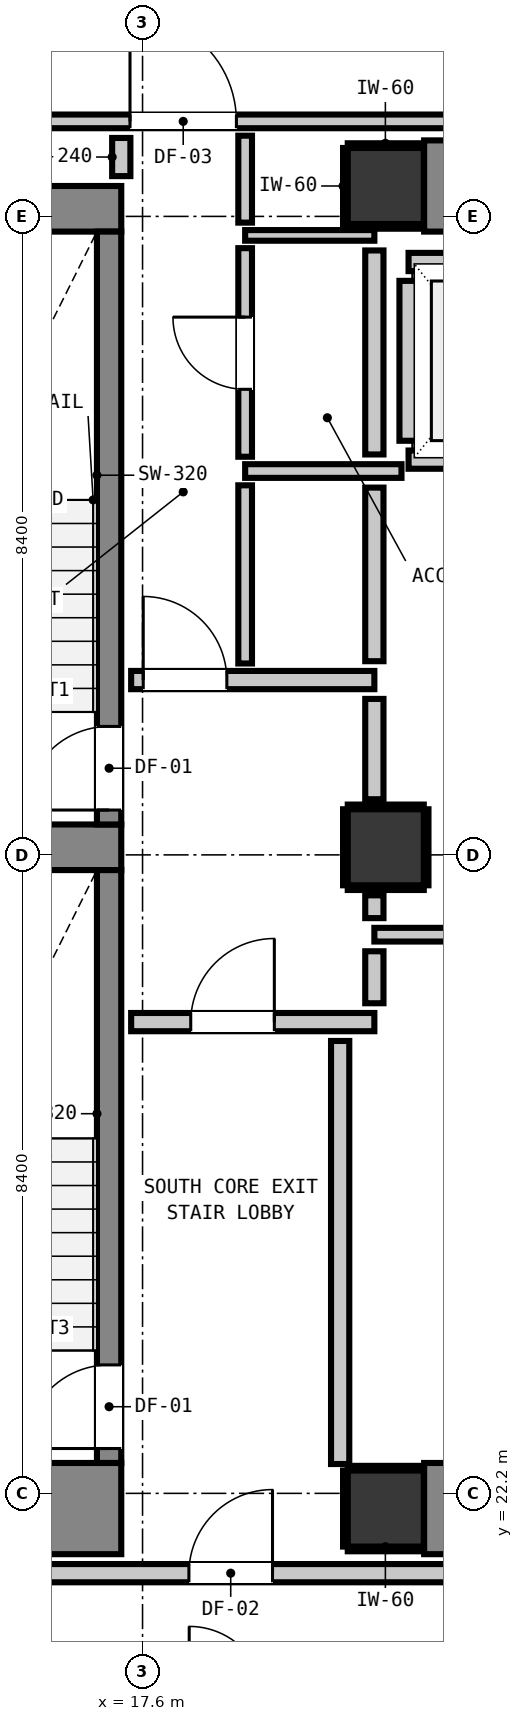
"""IFC4 building model, lengths in metres.
Left out: names, types, materials, properties, quantities, classifications, styles, units other than length and angle.
Written with IfcOpenShell. Run it as: python <this file> out.ifc"""

import sys

from ifc_helpers import new_model, si_unit, direction, frame, frame_2d, origin, origin_2d, place, context, subcontext, project, spatial, rectangle, extrude, element, fill, save


model = new_model("IFC4")
c1 = context("Model", 3, precision=1e-05, world=origin(), true_north=direction((0.0, 1.0)))
c2 = subcontext(c1, "Body", "Model", "MODEL_VIEW")
j1 = project(units=[si_unit("LENGTHUNIT", "METRE"), si_unit("PLANEANGLEUNIT", "RADIAN")], contexts=[c1])
p1 = place(None, origin())
s1 = spatial("IfcSite", under=j1, at=p1, CompositionType="ELEMENT")
p2 = place(p1, origin())
s2 = spatial("IfcBuilding", under=s1, at=p2, CompositionType="ELEMENT")
p3 = place(p2, frame((0.0, 0.0, 71.8)))
s3 = spatial("IfcBuildingStorey", under=s2, at=p3, CompositionType="ELEMENT", Elevation=71.8)
for number, where, z_axis, x_axis in (
    (1, (20.8, 22.0, 0.0), (0.0, 0.0, 1.0), (1.0, 0.0, 0.0)),
    (2, (20.8, 39.4, 0.0), (0.0, 0.0, 1.0), (1.0, 0.0, 0.0)),
):
    element("IfcColumn", number, at=place(p3, frame(where, z_axis=z_axis, x_axis=x_axis)), inside=s3, PredefinedType="COLUMN", context=c2, shape_type="SweptSolid", body=[
        extrude(rectangle(XDim=1.0, YDim=1.0, at=origin_2d()), origin(), (0.0, 0.0, 1.0), 3.32),
    ])
p4 = place(p3, frame((13.24, 22.0, 0.0), z_axis=(0.0, 0.0, 1.0), x_axis=(1.0, 0.0, 0.0)))
e3 = element("IfcWall", 3, at=p4, inside=s3, PredefinedType="SHEAR", context=c2, shape_type="SweptSolid", body=[
    extrude(rectangle(XDim=4.08, YDim=1.2, at=frame_2d((2.04, 0.0))), origin(), (0.0, 0.0, 1.0), 3.32),
])
p5 = place(p3, frame((13.24, 39.1, 0.0), z_axis=(0.0, 0.0, 1.0), x_axis=(1.0, 0.0, 0.0)))
e4 = element("IfcWall", 4, at=p5, inside=s3, PredefinedType="SHEAR", context=c2, shape_type="SweptSolid", body=[
    extrude(rectangle(XDim=4.08, YDim=0.6, at=frame_2d((2.04, 0.0))), origin(), (0.0, 0.0, 1.0), 3.32),
])
p6 = place(p3, frame((13.905, 30.7, 0.0), z_axis=(0.0, 0.0, 1.0), x_axis=(1.0, 0.0, 0.0)))
e5 = element("IfcWall", 5, at=p6, inside=s3, PredefinedType="SHEAR", context=c2, shape_type="SweptSolid", body=[
    extrude(rectangle(XDim=3.415, YDim=0.6, at=frame_2d((1.708, 0.0))), origin(), (0.0, 0.0, 1.0), 3.32),
])
for number, where, z_axis, x_axis in (
    (6, (21.305, 22.0, 0.0), (0.0, 0.0, 1.0), (1.0, 0.0, 0.0)),
    (7, (21.305, 39.4, 0.0), (0.0, 0.0, 1.0), (1.0, 0.0, 0.0)),
):
    element("IfcWall", number, at=place(p3, frame(where, z_axis=z_axis, x_axis=x_axis)), inside=s3, PredefinedType="SHEAR", context=c2, shape_type="SweptSolid", body=[
        extrude(rectangle(XDim=7.39, YDim=1.2, at=frame_2d((3.695, 0.0))), origin(), (0.0, 0.0, 1.0), 3.32),
    ])
p7 = place(p3, frame((17.16, 31.0, 0.0), z_axis=(0.0, 0.0, 1.0), x_axis=(0.0, 1.0, 0.0)))
e8 = element("IfcWall", 8, at=p7, inside=s3, PredefinedType="SHEAR", context=c2, shape_type="SweptSolid", body=[
    extrude(rectangle(XDim=7.8, YDim=0.32, at=frame_2d((3.9, 0.0))), origin(), (0.0, 0.0, 1.0), 3.32),
])
p8 = place(p7, frame((0.19, 0.0, 0.0)))
e9 = element("IfcOpeningElement", 9, at=p8, cuts=e8, PredefinedType="OPENING", context=c2, shape_type="SweptSolid", body=[
    extrude(rectangle(XDim=1.1, YDim=2.15, at=frame_2d((0.55, 1.075))), frame((0.0, 0.17, 0.0), z_axis=(0.0, -1.0, 0.0), x_axis=(1.0, 0.0, 0.0)), (0.0, 0.0, 1.0), 0.34),
])
p9 = place(p3, frame((17.16, 22.6, 0.0), z_axis=(0.0, 0.0, 1.0), x_axis=(0.0, 1.0, 0.0)))
e10 = element("IfcWall", 10, at=p9, inside=s3, PredefinedType="SHEAR", context=c2, shape_type="SweptSolid", body=[
    extrude(rectangle(XDim=7.8, YDim=0.32, at=frame_2d((3.9, 0.0))), origin(), (0.0, 0.0, 1.0), 3.32),
])
p10 = place(p9, frame((0.19, 0.0, 0.0)))
e11 = element("IfcOpeningElement", 11, at=p10, cuts=e10, PredefinedType="OPENING", context=c2, shape_type="SweptSolid", body=[
    extrude(rectangle(XDim=1.1, YDim=2.15, at=frame_2d((0.55, 1.075))), frame((0.0, 0.17, 0.0), z_axis=(0.0, -1.0, 0.0), x_axis=(1.0, 0.0, 0.0)), (0.0, 0.0, 1.0), 0.34),
])
p11 = place(p3, frame((20.8, 30.7, 0.0), z_axis=(0.0, 0.0, 1.0), x_axis=(1.0, 0.0, 0.0)))
e12 = element("IfcColumn", 12, at=p11, inside=s3, PredefinedType="COLUMN", context=c2, shape_type="SweptSolid", body=[
    extrude(rectangle(XDim=1.0, YDim=1.0, at=origin_2d()), origin(), (0.0, 0.0, 1.0), 3.32),
])
for number, where, z_axis, x_axis in (
    (13, (21.1, 35.8, 0.0), (0.0, 0.0, 1.0), (1.0, 0.0, 0.0)),
    (14, (21.1, 38.4, 0.0), (0.0, 0.0, 1.0), (1.0, 0.0, 0.0)),
):
    element("IfcWall", number, at=place(p3, frame(where, z_axis=z_axis, x_axis=x_axis)), inside=s3, PredefinedType="PARTITIONING", context=c2, shape_type="SweptSolid", body=[
        extrude(rectangle(XDim=2.2, YDim=0.24, at=frame_2d((1.1, 0.0))), origin(), (0.0, 0.0, 1.0), 3.06),
    ])
p12 = place(p3, frame((21.1, 36.048, 0.0), z_axis=(0.0, 0.0, 1.0), x_axis=(0.0, 1.0, 0.0)))
e15 = element("IfcWall", 15, at=p12, inside=s3, PredefinedType="PARTITIONING", context=c2, shape_type="SweptSolid", body=[
    extrude(rectangle(XDim=2.104, YDim=0.24, at=frame_2d((1.052, 0.0))), origin(), (0.0, 0.0, 1.0), 2.295),
])
p13 = place(p3, frame((10.15, 21.15, 0.0), z_axis=(0.0, 0.0, 1.0), x_axis=(1.0, 0.0, 0.0)))
e16 = element("IfcWall", 16, at=p13, inside=s3, PredefinedType="PARTITIONING", context=c2, shape_type="SweptSolid", body=[
    extrude(rectangle(XDim=26.779, YDim=0.24, at=frame_2d((13.39, 0.0))), origin(), (0.0, 0.0, 1.0), 3.06),
])
p14 = place(p13, frame((8.06, 0.0, 0.0)))
e17 = element("IfcOpeningElement", 17, at=p14, cuts=e16, PredefinedType="OPENING", context=c2, shape_type="SweptSolid", body=[
    extrude(rectangle(XDim=1.1, YDim=2.15, at=frame_2d((0.55, 1.075))), frame((0.0, 0.13, 0.0), z_axis=(0.0, -1.0, 0.0), x_axis=(1.0, 0.0, 0.0)), (0.0, 0.0, 1.0), 0.26),
])
p15 = place(p13, frame((0.324, 0.0, 0.0)))
e18 = element("IfcOpeningElement", 18, at=p15, cuts=e16, PredefinedType="OPENING", context=c2, shape_type="SweptSolid", body=[
    extrude(rectangle(XDim=1.4, YDim=2.15, at=frame_2d((0.7, 1.075))), frame((0.0, 0.13, 0.0), z_axis=(0.0, -1.0, 0.0), x_axis=(1.0, 0.0, 0.0)), (0.0, 0.0, 1.0), 0.26),
])
p16 = place(p3, frame((17.45, 28.4, 0.0), z_axis=(0.0, 0.0, 1.0), x_axis=(1.0, 0.0, 0.0)))
e19 = element("IfcWall", 19, at=p16, inside=s3, PredefinedType="PARTITIONING", context=c2, shape_type="SweptSolid", body=[
    extrude(rectangle(XDim=3.2, YDim=0.24, at=frame_2d((1.6, 0.0))), origin(), (0.0, 0.0, 1.0), 3.06),
])
p17 = place(p16, frame((0.784, 0.0, 0.0)))
e20 = element("IfcOpeningElement", 20, at=p17, cuts=e19, PredefinedType="OPENING", context=c2, shape_type="SweptSolid", body=[
    extrude(rectangle(XDim=1.1, YDim=2.15, at=frame_2d((0.55, 1.075))), frame((0.0, 0.13, 0.0), z_axis=(0.0, -1.0, 0.0), x_axis=(1.0, 0.0, 0.0)), (0.0, 0.0, 1.0), 0.26),
])
p18 = place(p3, frame((17.45, 32.9, 0.0), z_axis=(0.0, 0.0, 1.0), x_axis=(1.0, 0.0, 0.0)))
e21 = element("IfcWall", 21, at=p18, inside=s3, PredefinedType="PARTITIONING", context=c2, shape_type="SweptSolid", body=[
    extrude(rectangle(XDim=3.2, YDim=0.24, at=frame_2d((1.6, 0.0))), origin(), (0.0, 0.0, 1.0), 3.06),
])
p19 = place(p18, frame((0.159, 0.0, 0.0)))
e22 = element("IfcOpeningElement", 22, at=p19, cuts=e21, PredefinedType="OPENING", context=c2, shape_type="SweptSolid", body=[
    extrude(rectangle(XDim=1.1, YDim=2.15, at=frame_2d((0.55, 1.075))), frame((0.0, 0.13, 0.0), z_axis=(0.0, -1.0, 0.0), x_axis=(1.0, 0.0, 0.0)), (0.0, 0.0, 1.0), 0.26),
])
p20 = place(p3, frame((20.65, 29.55, 0.0), z_axis=(0.0, 0.0, 1.0), x_axis=(1.0, 0.0, 0.0)))
e23 = element("IfcWall", 23, at=p20, inside=s3, PredefinedType="PARTITIONING", context=c2, shape_type="SweptSolid", body=[
    extrude(rectangle(XDim=9.325, YDim=0.18, at=frame_2d((4.663, 0.0))), origin(), (0.0, 0.0, 1.0), 3.06),
])
p21 = place(p3, frame((18.95, 35.65, 0.0), z_axis=(0.0, 0.0, 1.0), x_axis=(1.0, 0.0, 0.0)))
e24 = element("IfcWall", 24, at=p21, inside=s3, PredefinedType="PARTITIONING", context=c2, shape_type="SweptSolid", body=[
    extrude(rectangle(XDim=2.057, YDim=0.18, at=frame_2d((1.029, 0.0))), origin(), (0.0, 0.0, 1.0), 3.06),
])
p22 = place(p3, frame((10.15, 40.25, 0.0), z_axis=(0.0, 0.0, 1.0), x_axis=(1.0, 0.0, 0.0)))
e25 = element("IfcWall", 25, at=p22, inside=s3, PredefinedType="PARTITIONING", context=c2, shape_type="SweptSolid", body=[
    extrude(rectangle(XDim=40.023, YDim=0.18, at=frame_2d((20.012, 0.0))), origin(), (0.0, 0.0, 1.0), 3.06),
])
p23 = place(p22, frame((7.285, 0.0, 0.0)))
e26 = element("IfcOpeningElement", 26, at=p23, cuts=e25, PredefinedType="OPENING", context=c2, shape_type="SweptSolid", body=[
    extrude(rectangle(XDim=1.4, YDim=2.15, at=frame_2d((0.7, 1.075))), frame((0.0, 0.1, 0.0), z_axis=(0.0, -1.0, 0.0), x_axis=(1.0, 0.0, 0.0)), (0.0, 0.0, 1.0), 0.2),
])
p24 = place(p22, frame((0.324, 0.0, 0.0)))
e27 = element("IfcOpeningElement", 27, at=p24, cuts=e25, PredefinedType="OPENING", context=c2, shape_type="SweptSolid", body=[
    extrude(rectangle(XDim=1.4, YDim=2.15, at=frame_2d((0.7, 1.075))), frame((0.0, 0.1, 0.0), z_axis=(0.0, -1.0, 0.0), x_axis=(1.0, 0.0, 0.0)), (0.0, 0.0, 1.0), 0.2),
])
p25 = place(p22, frame((33.574, 0.0, 0.0)))
e28 = element("IfcOpeningElement", 28, at=p25, cuts=e25, PredefinedType="OPENING", context=c2, shape_type="SweptSolid", body=[
    extrude(rectangle(XDim=1.0, YDim=2.15, at=frame_2d((0.5, 1.075))), frame((0.0, 0.1, 0.0), z_axis=(0.0, -1.0, 0.0), x_axis=(1.0, 0.0, 0.0)), (0.0, 0.0, 1.0), 0.2),
])
p26 = place(p3, frame((18.95, 38.75, 0.0), z_axis=(0.0, 0.0, 1.0), x_axis=(1.0, 0.0, 0.0)))
e29 = element("IfcWall", 29, at=p26, inside=s3, PredefinedType="PARTITIONING", context=c2, shape_type="SweptSolid", body=[
    extrude(rectangle(XDim=1.7, YDim=0.14, at=frame_2d((0.85, 0.0))), origin(), (0.0, 0.0, 1.0), 3.06),
])
p27 = place(p3, frame((17.32, 39.53, 0.0), z_axis=(0.0, 0.0, 1.0), x_axis=(0.0, 1.0, 0.0)))
e30 = element("IfcWall", 30, at=p27, inside=s3, PredefinedType="PARTITIONING", context=c2, shape_type="SweptSolid", body=[
    extrude(rectangle(XDim=0.502, YDim=0.24, at=frame_2d((0.251, 0.0))), origin(), (0.0, 0.0, 1.0), 3.06),
])
p28 = place(p3, frame((20.2, 22.586, 0.0), z_axis=(0.0, 0.0, 1.0), x_axis=(0.0, 1.0, 0.0)))
e31 = element("IfcWall", 31, at=p28, inside=s3, PredefinedType="PARTITIONING", context=c2, shape_type="SweptSolid", body=[
    extrude(rectangle(XDim=5.566, YDim=0.24, at=frame_2d((2.783, 0.0))), origin(), (0.0, 0.0, 1.0), 3.06),
])
p29 = place(p3, frame((20.65, 28.648, 0.0), z_axis=(0.0, 0.0, 1.0), x_axis=(0.0, 1.0, 0.0)))
e32 = element("IfcWall", 32, at=p29, inside=s3, PredefinedType="PARTITIONING", context=c2, shape_type="SweptSolid", body=[
    extrude(rectangle(XDim=0.684, YDim=0.24, at=frame_2d((0.342, 0.0))), origin(), (0.0, 0.0, 1.0), 2.295),
])
p30 = place(p3, frame((20.65, 29.768, 0.0), z_axis=(0.0, 0.0, 1.0), x_axis=(0.0, 1.0, 0.0)))
e33 = element("IfcWall", 33, at=p30, inside=s3, PredefinedType="PARTITIONING", context=c2, shape_type="SweptSolid", body=[
    extrude(rectangle(XDim=0.3, YDim=0.24, at=frame_2d((0.15, 0.0))), origin(), (0.0, 0.0, 1.0), 2.295),
])
p31 = place(p3, frame((20.65, 31.332, 0.0), z_axis=(0.0, 0.0, 1.0), x_axis=(0.0, 1.0, 0.0)))
e34 = element("IfcWall", 34, at=p31, inside=s3, PredefinedType="PARTITIONING", context=c2, shape_type="SweptSolid", body=[
    extrude(rectangle(XDim=1.32, YDim=0.24, at=frame_2d((0.66, 0.0))), origin(), (0.0, 0.0, 1.0), 2.295),
])
p32 = place(p3, frame((20.65, 33.148, 0.0), z_axis=(0.0, 0.0, 1.0), x_axis=(0.0, 1.0, 0.0)))
e35 = element("IfcWall", 35, at=p32, inside=s3, PredefinedType="PARTITIONING", context=c2, shape_type="SweptSolid", body=[
    extrude(rectangle(XDim=2.284, YDim=0.24, at=frame_2d((1.142, 0.0))), origin(), (0.0, 0.0, 1.0), 2.295),
])
p33 = place(p3, frame((20.65, 35.868, 0.0), z_axis=(0.0, 0.0, 1.0), x_axis=(0.0, 1.0, 0.0)))
e36 = element("IfcWall", 36, at=p33, inside=s3, PredefinedType="PARTITIONING", context=c2, shape_type="SweptSolid", body=[
    extrude(rectangle(XDim=2.684, YDim=0.24, at=frame_2d((1.342, 0.0))), origin(), (0.0, 0.0, 1.0), 2.295),
])
p34 = place(p3, frame((18.95, 33.118, 0.0), z_axis=(0.0, 0.0, 1.0), x_axis=(0.0, 1.0, 0.0)))
e37 = element("IfcWall", 37, at=p34, inside=s3, PredefinedType="PARTITIONING", context=c2, shape_type="SweptSolid", body=[
    extrude(rectangle(XDim=2.344, YDim=0.18, at=frame_2d((1.172, 0.0))), origin(), (0.0, 0.0, 1.0), 3.06),
])
p35 = place(p3, frame((18.95, 35.838, 0.0), z_axis=(0.0, 0.0, 1.0), x_axis=(0.0, 1.0, 0.0)))
e38 = element("IfcWall", 38, at=p35, inside=s3, PredefinedType="PARTITIONING", context=c2, shape_type="SweptSolid", body=[
    extrude(rectangle(XDim=2.744, YDim=0.18, at=frame_2d((1.372, 0.0))), origin(), (0.0, 0.0, 1.0), 3.06),
])
p36 = place(p35, frame((0.887, 0.0, 0.0)))
e39 = element("IfcOpeningElement", 39, at=p36, cuts=e38, PredefinedType="OPENING", context=c2, shape_type="SweptSolid", body=[
    extrude(rectangle(XDim=0.95, YDim=2.1, at=frame_2d((0.475, 1.05))), frame((0.0, 0.1, 0.0), z_axis=(0.0, -1.0, 0.0), x_axis=(1.0, 0.0, 0.0)), (0.0, 0.0, 1.0), 0.2),
])
p37 = place(p3, frame((18.95, 38.918, 0.0), z_axis=(0.0, 0.0, 1.0), x_axis=(0.0, 1.0, 0.0)))
e40 = element("IfcWall", 40, at=p37, inside=s3, PredefinedType="PARTITIONING", context=c2, shape_type="SweptSolid", body=[
    extrude(rectangle(XDim=1.144, YDim=0.18, at=frame_2d((0.572, 0.0))), origin(), (0.0, 0.0, 1.0), 3.06),
])
for number, where, z_axis, x_axis in (
    (41, (20.3, 21.468, 0.0), (0.0, 0.0, 1.0), (1.0, 0.0, 0.0)),
    (42, (20.3, 22.532, 0.0), (0.0, 0.0, 1.0), (1.0, 0.0, 0.0)),
):
    element("IfcWall", number, at=place(p3, frame(where, z_axis=z_axis, x_axis=x_axis)), inside=s3, PredefinedType="PARTITIONING", context=c2, shape_type="SweptSolid", body=[
        extrude(rectangle(XDim=0.99, YDim=0.06, at=frame_2d((0.495, 0.0))), origin(), (0.0, 0.0, 1.0), 1.45),
    ])
p38 = place(p3, frame((20.268, 21.5, 0.0), z_axis=(0.0, 0.0, 1.0), x_axis=(0.0, 1.0, 0.0)))
e43 = element("IfcWall", 43, at=p38, inside=s3, PredefinedType="PARTITIONING", context=c2, shape_type="SweptSolid", body=[
    extrude(rectangle(XDim=1.0, YDim=0.06, at=frame_2d((0.5, 0.0))), origin(), (0.0, 0.0, 1.0), 1.45),
])
for number, where, z_axis, x_axis in (
    (44, (20.3, 38.868, 0.0), (0.0, 0.0, 1.0), (1.0, 0.0, 0.0)),
    (45, (20.3, 39.932, 0.0), (0.0, 0.0, 1.0), (1.0, 0.0, 0.0)),
):
    element("IfcWall", number, at=place(p3, frame(where, z_axis=z_axis, x_axis=x_axis)), inside=s3, PredefinedType="PARTITIONING", context=c2, shape_type="SweptSolid", body=[
        extrude(rectangle(XDim=0.99, YDim=0.06, at=frame_2d((0.495, 0.0))), origin(), (0.0, 0.0, 1.0), 1.45),
    ])
for number, where, z_axis, x_axis in (
    (46, (20.268, 38.9, 0.0), (0.0, 0.0, 1.0), (0.0, 1.0, 0.0)),
    (47, (20.3, 30.168, 0.0), (0.0, 0.0, 1.0), (1.0, 0.0, 0.0)),
    (48, (20.3, 31.232, 0.0), (0.0, 0.0, 1.0), (1.0, 0.0, 0.0)),
    (49, (20.268, 30.2, 0.0), (0.0, 0.0, 1.0), (0.0, 1.0, 0.0)),
    (50, (21.332, 30.2, 0.0), (0.0, 0.0, 1.0), (0.0, 1.0, 0.0)),
):
    element("IfcWall", number, at=place(p3, frame(where, z_axis=z_axis, x_axis=x_axis)), inside=s3, PredefinedType="PARTITIONING", context=c2, shape_type="SweptSolid", body=[
        extrude(rectangle(XDim=1.0, YDim=0.06, at=frame_2d((0.5, 0.0))), origin(), (0.0, 0.0, 1.0), 1.45),
    ])
p39 = place(p8, origin())
e51 = element("IfcDoor", 51, at=p39, inside=s3, OperationType="SINGLE_SWING_LEFT", PredefinedType="DOOR", context=c2, shape_type="SweptSolid", body=[
    extrude(rectangle(XDim=1.1, YDim=2.15, at=frame_2d((0.55, 1.075))), frame((0.0, 0.025, 0.0), z_axis=(0.0, -1.0, 0.0), x_axis=(1.0, 0.0, 0.0)), (0.0, 0.0, 1.0), 0.05),
])
fill(e9, e51)
p40 = place(p10, origin())
e52 = element("IfcDoor", 52, at=p40, inside=s3, OperationType="SINGLE_SWING_LEFT", PredefinedType="DOOR", context=c2, shape_type="SweptSolid", body=[
    extrude(rectangle(XDim=1.1, YDim=2.15, at=frame_2d((0.55, 1.075))), frame((0.0, 0.025, 0.0), z_axis=(0.0, -1.0, 0.0), x_axis=(1.0, 0.0, 0.0)), (0.0, 0.0, 1.0), 0.05),
])
fill(e11, e52)
p41 = place(p17, origin())
e53 = element("IfcDoor", 53, at=p41, inside=s3, OperationType="SINGLE_SWING_RIGHT", PredefinedType="DOOR", context=c2, shape_type="SweptSolid", body=[
    extrude(rectangle(XDim=1.1, YDim=2.15, at=frame_2d((0.55, 1.075))), frame((0.0, 0.025, 0.0), z_axis=(0.0, -1.0, 0.0), x_axis=(1.0, 0.0, 0.0)), (0.0, 0.0, 1.0), 0.05),
])
fill(e20, e53)
p42 = place(p19, origin())
e54 = element("IfcDoor", 54, at=p42, inside=s3, OperationType="SINGLE_SWING_LEFT", PredefinedType="DOOR", context=c2, shape_type="SweptSolid", body=[
    extrude(rectangle(XDim=1.1, YDim=2.15, at=frame_2d((0.55, 1.075))), frame((0.0, 0.025, 0.0), z_axis=(0.0, -1.0, 0.0), x_axis=(1.0, 0.0, 0.0)), (0.0, 0.0, 1.0), 0.05),
])
fill(e22, e54)
p43 = place(p14, origin())
e55 = element("IfcDoor", 55, at=p43, inside=s3, OperationType="SINGLE_SWING_RIGHT", PredefinedType="DOOR", context=c2, shape_type="SweptSolid", body=[
    extrude(rectangle(XDim=1.1, YDim=2.15, at=frame_2d((0.55, 1.075))), frame((0.0, 0.025, 0.0), z_axis=(0.0, -1.0, 0.0), x_axis=(1.0, 0.0, 0.0)), (0.0, 0.0, 1.0), 0.05),
])
fill(e17, e55)
p44 = place(p23, origin())
e56 = element("IfcDoor", 56, at=p44, inside=s3, OperationType="SINGLE_SWING_LEFT", PredefinedType="DOOR", context=c2, shape_type="SweptSolid", body=[
    extrude(rectangle(XDim=1.4, YDim=2.15, at=frame_2d((0.7, 1.075))), frame((0.0, 0.025, 0.0), z_axis=(0.0, -1.0, 0.0), x_axis=(1.0, 0.0, 0.0)), (0.0, 0.0, 1.0), 0.05),
])
fill(e26, e56)
p45 = place(p36, origin())
e57 = element("IfcDoor", 57, at=p45, inside=s3, OperationType="SINGLE_SWING_RIGHT", PredefinedType="DOOR", context=c2, shape_type="SweptSolid", body=[
    extrude(rectangle(XDim=0.95, YDim=2.1, at=frame_2d((0.475, 1.05))), frame((0.0, 0.025, 0.0), z_axis=(0.0, -1.0, 0.0), x_axis=(1.0, 0.0, 0.0)), (0.0, 0.0, 1.0), 0.05),
])
fill(e39, e57)
save(model, sys.argv[1])
